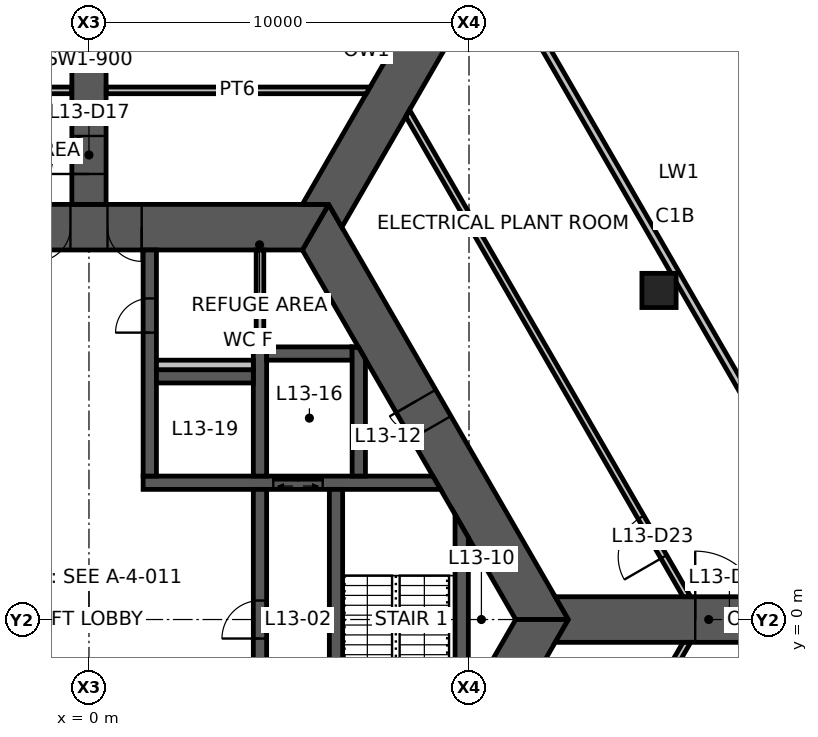
"""IFC4 building model, lengths in metres.
Left out: names, types, materials, properties, quantities, classifications, styles, units other than length and angle.
Written with IfcOpenShell. Run it as: python <this file> out.ifc"""

import sys

from ifc_helpers import new_model, si_unit, direction, frame, frame_2d, origin, origin_2d, place, context, subcontext, project, spatial, polyline, rectangle, hollow_rectangle, outline, extrude, element, fill, save


model = new_model("IFC4")
c1 = context("Model", 3, precision=1e-05, world=origin(), true_north=direction((0.0, 1.0)))
c2 = subcontext(c1, "Body", "Model", "MODEL_VIEW")
j1 = project(units=[si_unit("LENGTHUNIT", "METRE"), si_unit("PLANEANGLEUNIT", "RADIAN")], contexts=[c1])
p1 = place(None, origin())
s1 = spatial("IfcSite", under=j1, at=p1, CompositionType="ELEMENT")
p2 = place(p1, origin())
s2 = spatial("IfcBuilding", under=s1, at=p2, CompositionType="ELEMENT")
p3 = place(p2, frame((0.0, 0.0, 52.0)))
s3 = spatial("IfcBuildingStorey", under=s2, at=p3, CompositionType="ELEMENT", Elevation=52.0)
p4 = place(p3, frame((15.0, 8.66, 0.0), z_axis=(0.0, 0.0, 1.0), x_axis=(1.0, 0.0, 0.0)))
e1 = element("IfcColumn", 1, at=p4, inside=s3, PredefinedType="COLUMN", context=c2, shape_type="SweptSolid", body=[
    extrude(hollow_rectangle(XDim=0.9, YDim=0.9, WallThickness=0.05, at=origin_2d()), origin(), (0.0, 0.0, 1.0), 5.0),
])
p5 = place(p3, frame((11.922, 0.0, 0.0), z_axis=(0.0, 0.0, 1.0), x_axis=(-0.500004296715, 0.866022923061, 0.0)))
e2 = element("IfcWall", 2, at=p5, inside=s3, PredefinedType="SHEAR", context=c2, shape_type="SweptSolid", body=[
    extrude(outline(polyline([(-0.346, -0.6), (5.835, -0.6), (6.635, -0.6), (12.269, -0.6), (11.576, 0.6), (6.635, 0.6), (5.835, 0.6), (0.346, 0.6), (-0.346, -0.6)])), origin(), (0.0, 0.0, 1.0), 5.0),
])
p6 = place(p5, frame((5.835, 0.0, 0.0)))
e3 = element("IfcOpeningElement", 3, at=p6, cuts=e2, PredefinedType="OPENING", context=c2, shape_type="SweptSolid", body=[
    extrude(rectangle(XDim=0.8, YDim=2.1, at=frame_2d((0.4, 1.05))), frame((0.0, 0.61, 0.0), z_axis=(0.0, -1.0, 0.0), x_axis=(1.0, 0.0, 0.0)), (0.0, 0.0, 1.0), 1.22),
])
p7 = place(p3, frame((5.961, 10.325, 0.0), z_axis=(0.0, 0.0, 1.0), x_axis=(-1.0, 0.0, 0.0)))
e4 = element("IfcWall", 4, at=p7, inside=s3, PredefinedType="SHEAR", context=c2, shape_type="SweptSolid", body=[
    extrude(outline(polyline([(-0.346, -0.6), (4.574, -0.6), (5.474, -0.6), (6.449, -0.6), (7.349, -0.6), (12.269, -0.6), (11.576, 0.6), (7.349, 0.6), (6.449, 0.6), (5.474, 0.6), (4.574, 0.6), (0.346, 0.6), (-0.346, -0.6)])), origin(), (0.0, 0.0, 1.0), 5.0),
])
p8 = place(p7, frame((6.449, 0.0, 0.0)))
e5 = element("IfcOpeningElement", 5, at=p8, cuts=e4, PredefinedType="OPENING", context=c2, shape_type="SweptSolid", body=[
    extrude(rectangle(XDim=0.9, YDim=2.1, at=frame_2d((0.45, 1.05))), frame((0.0, 0.61, 0.0), z_axis=(0.0, -1.0, 0.0), x_axis=(1.0, 0.0, 0.0)), (0.0, 0.0, 1.0), 1.22),
])
p9 = place(p7, frame((4.574, 0.0, 0.0)))
e6 = element("IfcOpeningElement", 6, at=p9, cuts=e4, PredefinedType="OPENING", context=c2, shape_type="SweptSolid", body=[
    extrude(rectangle(XDim=0.9, YDim=2.1, at=frame_2d((0.45, 1.05))), frame((0.0, 0.61, 0.0), z_axis=(0.0, -1.0, 0.0), x_axis=(1.0, 0.0, 0.0)), (0.0, 0.0, 1.0), 1.22),
])
p10 = place(p3, frame((5.961, -10.325, 0.0), z_axis=(0.0, 0.0, 1.0), x_axis=(0.500004296715, 0.866022923061, 0.0)))
e7 = element("IfcWall", 7, at=p10, inside=s3, PredefinedType="SHEAR", context=c2, shape_type="SweptSolid", body=[
    extrude(outline(polyline([(-0.346, -0.6), (3.208, -0.6), (4.009, -0.6), (12.269, -0.6), (11.576, 0.6), (4.009, 0.6), (3.208, 0.6), (0.346, 0.6), (-0.346, -0.6)])), origin(), (0.0, 0.0, 1.0), 5.0),
])
p11 = place(p10, frame((3.208, 0.0, 0.0)))
e8 = element("IfcOpeningElement", 8, at=p11, cuts=e7, PredefinedType="OPENING", context=c2, shape_type="SweptSolid", body=[
    extrude(rectangle(XDim=0.8, YDim=2.1, at=frame_2d((0.4, 1.05))), frame((0.0, 0.61, 0.0), z_axis=(0.0, -1.0, 0.0), x_axis=(1.0, 0.0, 0.0)), (0.0, 0.0, 1.0), 1.22),
])
p12 = place(p3, frame((0.0, 10.925, 0.0), z_axis=(0.0, 0.0, 1.0), x_axis=(0.0, 1.0, 0.0)))
e9 = element("IfcWall", 9, at=p12, inside=s3, PredefinedType="SHEAR", context=c2, shape_type="SweptSolid", body=[
    extrude(rectangle(XDim=7.595, YDim=0.9, at=frame_2d((3.798, 0.0))), origin(), (0.0, 0.0, 1.0), 5.0),
])
p13 = place(p12, frame((0.8, 0.0, 0.0)))
e10 = element("IfcOpeningElement", 10, at=p13, cuts=e9, PredefinedType="OPENING", context=c2, shape_type="SweptSolid", body=[
    extrude(rectangle(XDim=1.0, YDim=2.1, at=frame_2d((0.5, 1.05))), frame((0.0, 0.46, 0.0), z_axis=(0.0, -1.0, 0.0), x_axis=(1.0, 0.0, 0.0)), (0.0, 0.0, 1.0), 0.92),
])
p14 = place(p3, frame((12.615, 0.0, -1.15), z_axis=(0.0, 0.0, 1.0), x_axis=(1.0, 0.0, 0.0)))
e11 = element("IfcWall", 11, at=p14, inside=s3, PredefinedType="SHEAR", context=c2, shape_type="SweptSolid", body=[
    extrude(outline(polyline([(-0.346, -0.6), (3.338, -0.6), (5.138, -0.6), (7.385, -0.6), (7.385, 0.6), (5.138, 0.6), (3.338, 0.6), (-0.346, 0.6), (0.0, 0.0), (-0.346, -0.6)])), origin(), (0.0, 0.0, 1.0), 6.15),
])
p15 = place(p14, frame((3.338, 0.0, 1.15)))
e12 = element("IfcOpeningElement", 12, at=p15, cuts=e11, PredefinedType="OPENING", context=c2, shape_type="SweptSolid", body=[
    extrude(rectangle(XDim=1.8, YDim=2.4, at=frame_2d((0.9, 1.2))), frame((0.0, 0.61, 0.0), z_axis=(0.0, -1.0, 0.0), x_axis=(1.0, 0.0, 0.0)), (0.0, 0.0, 1.0), 1.22),
])
p16 = place(p3, frame((6.308, 10.925, -1.15), z_axis=(0.0, 0.0, 1.0), x_axis=(0.499993363642, 0.866029235253, 0.0)))
e13 = element("IfcWall", 13, at=p16, inside=s3, PredefinedType="SHEAR", context=c2, shape_type="SweptSolid", body=[
    extrude(outline(polyline([(-0.346, -0.6), (7.385, -0.6), (7.385, 0.6), (-0.346, 0.6), (0.0, 0.0), (-0.346, -0.6)])), origin(), (0.0, 0.0, 1.0), 6.15),
])
p17 = place(p3, frame((20.389, 0.526, 0.0), z_axis=(0.0, 0.0, 1.0), x_axis=(-0.499999841607, 0.866025495233, 0.0)))
e14 = element("IfcWall", 14, at=p17, inside=s3, PredefinedType="ELEMENTEDWALL", context=c2, shape_type="SweptSolid", body=[
    extrude(rectangle(XDim=19.479, YDim=0.2, at=frame_2d((9.739, 0.0))), origin(), (0.0, 0.0, 1.0), 5.0),
])
p18 = place(p3, frame((1.425, 3.6, 0.0), z_axis=(0.0, 0.0, 1.0), x_axis=(1.0, 0.0, 0.0)))
e15 = element("IfcWall", 15, at=p18, inside=s3, PredefinedType="SHEAR", context=c2, shape_type="SweptSolid", body=[
    extrude(outline(polyline([(0.0, -0.175), (3.425, -0.175), (4.725, -0.175), (7.827, -0.175), (7.625, 0.175), (4.725, 0.175), (3.425, 0.175), (0.0, 0.175), (0.0, -0.175)])), origin(), (0.0, 0.0, 1.0), 5.0),
])
p19 = place(p18, frame((3.425, 0.0, 0.0)))
e16 = element("IfcOpeningElement", 16, at=p19, cuts=e15, PredefinedType="OPENING", context=c2, shape_type="SweptSolid", body=[
    extrude(rectangle(XDim=1.3, YDim=2.1, at=frame_2d((0.65, 1.05))), frame((0.0, 0.185, 0.0), z_axis=(0.0, -1.0, 0.0), x_axis=(1.0, 0.0, 0.0)), (0.0, 0.0, 1.0), 0.37),
])
p20 = place(p3, frame((1.6, 3.775, 0.0), z_axis=(0.0, 0.0, 1.0), x_axis=(0.0, 1.0, 0.0)))
e17 = element("IfcWall", 17, at=p20, inside=s3, PredefinedType="SHEAR", context=c2, shape_type="SweptSolid", body=[
    extrude(rectangle(XDim=5.95, YDim=0.35, at=frame_2d((2.975, 0.0))), origin(), (0.0, 0.0, 1.0), 5.0),
])
p21 = place(p20, frame((3.775, 0.0, 0.0)))
e18 = element("IfcOpeningElement", 18, at=p21, cuts=e17, PredefinedType="OPENING", context=c2, shape_type="SweptSolid", body=[
    extrude(rectangle(XDim=0.9, YDim=2.1, at=frame_2d((0.45, 1.05))), frame((0.0, 0.185, 0.0), z_axis=(0.0, -1.0, 0.0), x_axis=(1.0, 0.0, 0.0)), (0.0, 0.0, 1.0), 0.37),
])
p22 = place(p3, frame((4.5, -3.425, 0.0), z_axis=(0.0, 0.0, 1.0), x_axis=(0.0, 1.0, 0.0)))
e19 = element("IfcWall", 19, at=p22, inside=s3, PredefinedType="SHEAR", context=c2, shape_type="SweptSolid", body=[
    extrude(rectangle(XDim=6.85, YDim=0.35, at=frame_2d((3.425, 0.0))), origin(), (0.0, 0.0, 1.0), 5.0),
])
p23 = place(p22, frame((2.925, 0.0, 0.0)))
e20 = element("IfcOpeningElement", 20, at=p23, cuts=e19, PredefinedType="OPENING", context=c2, shape_type="SweptSolid", body=[
    extrude(rectangle(XDim=1.0, YDim=2.1, at=frame_2d((0.5, 1.05))), frame((0.0, 0.185, 0.0), z_axis=(0.0, -1.0, 0.0), x_axis=(1.0, 0.0, 0.0)), (0.0, 0.0, 1.0), 0.37),
])
p24 = place(p3, frame((6.5, -3.425, 0.0), z_axis=(0.0, 0.0, 1.0), x_axis=(0.0, 1.0, 0.0)))
e21 = element("IfcWall", 21, at=p24, inside=s3, PredefinedType="SHEAR", context=c2, shape_type="SweptSolid", body=[
    extrude(rectangle(XDim=6.85, YDim=0.35, at=frame_2d((3.425, 0.0))), origin(), (0.0, 0.0, 1.0), 5.0),
])
p25 = place(p24, frame((0.1, 0.0, 0.0)))
e22 = element("IfcOpeningElement", 22, at=p25, cuts=e21, PredefinedType="OPENING", context=c2, shape_type="SweptSolid", body=[
    extrude(rectangle(XDim=1.0, YDim=2.1, at=frame_2d((0.5, 1.05))), frame((0.0, 0.185, 0.0), z_axis=(0.0, -1.0, 0.0), x_axis=(1.0, 0.0, 0.0)), (0.0, 0.0, 1.0), 0.37),
])
p26 = place(p3, frame((4.5, 3.775, 0.0), z_axis=(0.0, 0.0, 1.0), x_axis=(0.0, 1.0, 0.0)))
e23 = element("IfcWall", 23, at=p26, inside=s3, PredefinedType="SHEAR", context=c2, shape_type="SweptSolid", body=[
    extrude(rectangle(XDim=3.4, YDim=0.35, at=frame_2d((1.7, 0.0))), origin(), (0.0, 0.0, 1.0), 5.0),
])
p27 = place(p3, frame((1.775, 6.4, 0.0), z_axis=(0.0, 0.0, 1.0), x_axis=(1.0, 0.0, 0.0)))
e24 = element("IfcWall", 24, at=p27, inside=s3, PredefinedType="SHEAR", context=c2, shape_type="SweptSolid", body=[
    extrude(rectangle(XDim=2.55, YDim=0.35, at=frame_2d((1.275, 0.0))), origin(), (0.0, 0.0, 1.0), 5.0),
])
p28 = place(p3, frame((4.675, 7.0, 0.0), z_axis=(0.0, 0.0, 1.0), x_axis=(1.0, 0.0, 0.0)))
e25 = element("IfcWall", 25, at=p28, inside=s3, PredefinedType="SHEAR", context=c2, shape_type="SweptSolid", body=[
    extrude(rectangle(XDim=2.25, YDim=0.35, at=frame_2d((1.125, 0.0))), origin(), (0.0, 0.0, 1.0), 5.0),
])
p29 = place(p3, frame((7.1, 3.775, 0.0), z_axis=(0.0, 0.0, 1.0), x_axis=(0.0, 1.0, 0.0)))
e26 = element("IfcWall", 26, at=p29, inside=s3, PredefinedType="SHEAR", context=c2, shape_type="SweptSolid", body=[
    extrude(outline(polyline([(0.0, -0.175), (3.074, -0.175), (3.377, 0.0), (3.4, 0.175), (0.0, 0.175), (0.0, -0.175)])), origin(), (0.0, 0.0, 1.0), 5.0),
])
p30 = place(p3, frame((9.808, -2.462, 0.0), z_axis=(0.0, 0.0, 1.0), x_axis=(0.0, 1.0, 0.0)))
e27 = element("IfcWall", 27, at=p30, inside=s3, PredefinedType="SHEAR", context=c2, shape_type="SweptSolid", body=[
    extrude(outline(polyline([(0.303, -0.175), (4.621, -0.175), (5.228, 0.175), (-0.303, 0.175), (0.303, -0.175)])), origin(), (0.0, 0.0, 1.0), 5.0),
])
p31 = place(p3, frame((4.5, 7.175, 0.0), z_axis=(0.0, 0.0, 1.0), x_axis=(0.0, 1.0, 0.0)))
e28 = element("IfcWall", 28, at=p31, inside=s3, PredefinedType="STANDARD", context=c2, shape_type="SweptSolid", body=[
    extrude(rectangle(XDim=2.55, YDim=0.2, at=frame_2d((1.275, 0.0))), origin(), (0.0, 0.0, 1.0), 5.0),
])
p32 = place(p3, frame((1.775, 6.7, 0.0), z_axis=(0.0, 0.0, 1.0), x_axis=(1.0, 0.0, 0.0)))
e29 = element("IfcWall", 29, at=p32, inside=s3, PredefinedType="PLUMBINGWALL", context=c2, shape_type="SweptSolid", body=[
    extrude(rectangle(XDim=2.55, YDim=0.25, at=frame_2d((1.275, 0.0))), origin(), (0.0, 0.0, 1.0), 5.0),
])
p33 = place(p3, frame((15.733, 0.6, 0.0), z_axis=(0.0, 0.0, 1.0), x_axis=(-0.49999908555, 0.866025931742, 0.0)))
e30 = element("IfcWall", 30, at=p33, inside=s3, PredefinedType="PARTITIONING", context=c2, shape_type="SweptSolid", body=[
    extrude(outline(polyline([(-0.051, -0.087), (1.213, -0.087), (2.413, -0.087), (14.744, -0.087), (14.643, 0.087), (2.413, 0.087), (1.213, 0.087), (0.051, 0.087), (-0.051, -0.087)])), origin(), (0.0, 0.0, 1.0), 4.83),
])
p34 = place(p33, frame((1.213, 0.0, 0.0)))
e31 = element("IfcOpeningElement", 31, at=p34, cuts=e30, PredefinedType="OPENING", context=c2, shape_type="SweptSolid", body=[
    extrude(rectangle(XDim=1.2, YDim=2.1, at=frame_2d((0.6, 1.05))), frame((0.0, 0.098, 0.0), z_axis=(0.0, -1.0, 0.0), x_axis=(1.0, 0.0, 0.0)), (0.0, 0.0, 1.0), 0.195),
])
p35 = place(p3, frame((7.347, 13.925, 0.0), z_axis=(0.0, 0.0, 1.0), x_axis=(-1.0, 0.0, 0.0)))
e32 = element("IfcWall", 32, at=p35, inside=s3, PredefinedType="PARTITIONING", context=c2, shape_type="SweptSolid", body=[
    extrude(outline(polyline([(-0.051, -0.087), (6.892, -0.087), (6.892, 0.087), (0.051, 0.087), (-0.051, -0.087)])), origin(), (0.0, 0.0, 1.0), 4.83),
])
p36 = place(p3, frame((-0.455, 13.925, 0.0), z_axis=(0.0, 0.0, 1.0), x_axis=(-1.0, 0.0, 0.0)))
e33 = element("IfcWall", 33, at=p36, inside=s3, PredefinedType="PARTITIONING", context=c2, shape_type="SweptSolid", body=[
    extrude(outline(polyline([(0.0, -0.087), (1.9, -0.087), (3.1, -0.087), (6.942, -0.087), (6.841, 0.087), (3.1, 0.087), (1.9, 0.087), (0.0, 0.087), (0.0, -0.087)])), origin(), (0.0, 0.0, 1.0), 4.83),
])
p37 = place(p36, frame((1.9, 0.0, 0.0)))
e34 = element("IfcOpeningElement", 34, at=p37, cuts=e33, PredefinedType="OPENING", context=c2, shape_type="SweptSolid", body=[
    extrude(rectangle(XDim=1.2, YDim=2.1, at=frame_2d((0.6, 1.05))), frame((0.0, 0.098, 0.0), z_axis=(0.0, -1.0, 0.0), x_axis=(1.0, 0.0, 0.0)), (0.0, 0.0, 1.0), 0.195),
])
p38 = place(p3, frame((12.287, -6.569, 0.0), z_axis=(0.0, 0.0, 1.0), x_axis=(0.49998719302, 0.866032797772, 0.0)))
e35 = element("IfcWall", 35, at=p38, inside=s3, PredefinedType="PARTITIONING", context=c2, shape_type="SweptSolid", body=[
    extrude(outline(polyline([(0.0, -0.087), (1.9, -0.087), (3.1, -0.087), (6.942, -0.087), (6.841, 0.087), (3.1, 0.087), (1.9, 0.087), (0.0, 0.087), (0.0, -0.087)])), origin(), (0.0, 0.0, 1.0), 4.83),
])
p39 = place(p38, frame((1.9, 0.0, 0.0)))
e36 = element("IfcOpeningElement", 36, at=p39, cuts=e35, PredefinedType="OPENING", context=c2, shape_type="SweptSolid", body=[
    extrude(rectangle(XDim=1.2, YDim=2.1, at=frame_2d((0.6, 1.05))), frame((0.0, 0.098, 0.0), z_axis=(0.0, -1.0, 0.0), x_axis=(1.0, 0.0, 0.0)), (0.0, 0.0, 1.0), 0.195),
])
p40 = place(p8, origin())
e37 = element("IfcDoor", 37, at=p40, inside=s3, OperationType="SINGLE_SWING_RIGHT", PredefinedType="DOOR", context=c2, shape_type="SweptSolid", body=[
    extrude(rectangle(XDim=0.9, YDim=2.1, at=frame_2d((0.45, 1.05))), frame((0.0, 0.025, 0.0), z_axis=(0.0, -1.0, 0.0), x_axis=(1.0, 0.0, 0.0)), (0.0, 0.0, 1.0), 0.05),
])
fill(e5, e37)
p41 = place(p9, origin())
e38 = element("IfcDoor", 38, at=p41, inside=s3, OperationType="SINGLE_SWING_LEFT", PredefinedType="DOOR", context=c2, shape_type="SweptSolid", body=[
    extrude(rectangle(XDim=0.9, YDim=2.1, at=frame_2d((0.45, 1.05))), frame((0.0, 0.025, 0.0), z_axis=(0.0, -1.0, 0.0), x_axis=(1.0, 0.0, 0.0)), (0.0, 0.0, 1.0), 0.05),
])
fill(e6, e38)
p42 = place(p6, origin())
e39 = element("IfcDoor", 39, at=p42, inside=s3, OperationType="SINGLE_SWING_RIGHT", PredefinedType="DOOR", context=c2, shape_type="SweptSolid", body=[
    extrude(rectangle(XDim=0.8, YDim=2.1, at=frame_2d((0.4, 1.05))), frame((0.0, 0.025, 0.0), z_axis=(0.0, -1.0, 0.0), x_axis=(1.0, 0.0, 0.0)), (0.0, 0.0, 1.0), 0.05),
])
fill(e3, e39)
p43 = place(p23, origin())
e40 = element("IfcDoor", 40, at=p43, inside=s3, OperationType="SINGLE_SWING_LEFT", PredefinedType="DOOR", context=c2, shape_type="SweptSolid", body=[
    extrude(rectangle(XDim=1.0, YDim=2.1, at=frame_2d((0.5, 1.05))), frame((0.0, 0.025, 0.0), z_axis=(0.0, -1.0, 0.0), x_axis=(1.0, 0.0, 0.0)), (0.0, 0.0, 1.0), 0.05),
])
fill(e20, e40)
p44 = place(p21, origin())
e41 = element("IfcDoor", 41, at=p44, inside=s3, OperationType="SINGLE_SWING_LEFT", PredefinedType="DOOR", context=c2, shape_type="SweptSolid", body=[
    extrude(rectangle(XDim=0.9, YDim=2.1, at=frame_2d((0.45, 1.05))), frame((0.0, 0.025, 0.0), z_axis=(0.0, -1.0, 0.0), x_axis=(1.0, 0.0, 0.0)), (0.0, 0.0, 1.0), 0.05),
])
fill(e18, e41)
p45 = place(p13, origin())
e42 = element("IfcDoor", 42, at=p45, inside=s3, OperationType="SINGLE_SWING_LEFT", PredefinedType="DOOR", context=c2, shape_type="SweptSolid", body=[
    extrude(rectangle(XDim=1.0, YDim=2.1, at=frame_2d((0.5, 1.05))), frame((0.0, 0.025, 0.0), z_axis=(0.0, -1.0, 0.0), x_axis=(1.0, 0.0, 0.0)), (0.0, 0.0, 1.0), 0.05),
])
fill(e10, e42)
p46 = place(p15, origin())
e43 = element("IfcDoor", 43, at=p46, inside=s3, OperationType="DOUBLE_DOOR_SINGLE_SWING", PredefinedType="DOOR", context=c2, shape_type="SweptSolid", body=[
    extrude(rectangle(XDim=1.8, YDim=2.4, at=frame_2d((0.9, 1.2))), frame((0.0, 0.025, 0.0), z_axis=(0.0, -1.0, 0.0), x_axis=(1.0, 0.0, 0.0)), (0.0, 0.0, 1.0), 0.05),
])
fill(e12, e43)
p47 = place(p34, origin())
e44 = element("IfcDoor", 44, at=p47, inside=s3, OperationType="DOUBLE_DOOR_SINGLE_SWING", PredefinedType="DOOR", context=c2, shape_type="SweptSolid", body=[
    extrude(rectangle(XDim=1.2, YDim=2.1, at=frame_2d((0.6, 1.05))), frame((0.0, 0.025, 0.0), z_axis=(0.0, -1.0, 0.0), x_axis=(1.0, 0.0, 0.0)), (0.0, 0.0, 1.0), 0.05),
])
fill(e31, e44)
p48 = place(p19, origin())
e45 = element("IfcDoor", 45, at=p48, inside=s3, OperationType="DOUBLE_DOOR_SLIDING", PredefinedType="DOOR", context=c2, shape_type="SweptSolid", body=[
    extrude(rectangle(XDim=1.3, YDim=2.1, at=frame_2d((0.65, 1.05))), frame((0.0, 0.025, 0.0), z_axis=(0.0, -1.0, 0.0), x_axis=(1.0, 0.0, 0.0)), (0.0, 0.0, 1.0), 0.05),
])
fill(e16, e45)
save(model, sys.argv[1])
